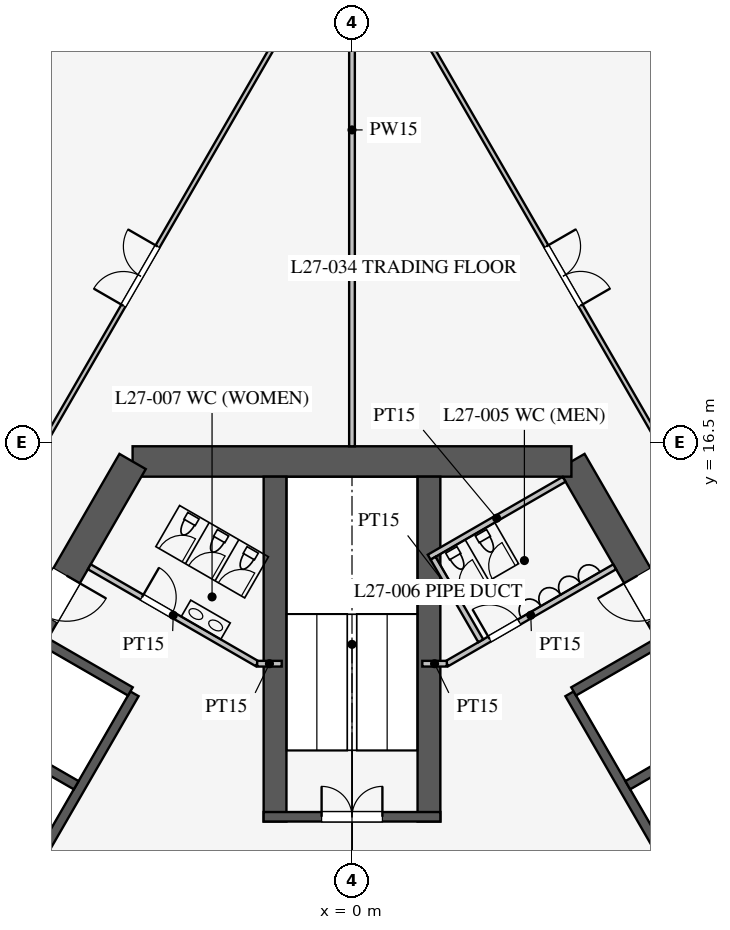
"""IFC4 building model, lengths in metres.
Left out: names, types, materials, properties, quantities, classifications, styles, units other than length and angle.
Written with IfcOpenShell. Run it as: python <this file> out.ifc"""

import sys

from ifc_helpers import new_model, si_unit, direction, frame, frame_2d, origin, place, context, subcontext, project, spatial, rectangle, extrude, element, fill, save


model = new_model("IFC4")
c1 = context("Model", 3, precision=1e-05, world=origin(), true_north=direction((0.0, 1.0)))
c2 = subcontext(c1, "Body", "Model", "MODEL_VIEW")
j1 = project(units=[si_unit("LENGTHUNIT", "METRE"), si_unit("PLANEANGLEUNIT", "RADIAN")], contexts=[c1])
p1 = place(None, origin())
s1 = spatial("IfcSite", under=j1, at=p1, CompositionType="ELEMENT")
p2 = place(p1, origin())
s2 = spatial("IfcBuilding", under=s1, at=p2, CompositionType="ELEMENT")
p3 = place(p2, frame((0.0, 0.0, 119.9)))
s3 = spatial("IfcBuildingStorey", under=s2, at=p3, CompositionType="ELEMENT", Elevation=119.9)
p4 = place(p3, frame((16.743, -3.0, 0.0), z_axis=(0.0, 0.0, 1.0), x_axis=(-0.500002442456, 0.866023993627, 0.0)))
e1 = element("IfcWall", 1, at=p4, inside=s3, PredefinedType="SHEAR", context=c2, shape_type="SweptSolid", body=[
    extrude(rectangle(XDim=21.939, YDim=0.8, at=frame_2d((10.97, 0.0))), origin(), (0.0, 0.0, 1.0), 4.2),
])
p5 = place(p4, frame((17.27, 0.0, 0.0)))
e2 = element("IfcOpeningElement", 2, at=p5, cuts=e1, PredefinedType="OPENING", context=c2, shape_type="SweptSolid", body=[
    extrude(rectangle(XDim=1.2, YDim=2.1, at=frame_2d((0.6, 1.05))), frame((0.0, 0.41, 0.0), z_axis=(0.0, -1.0, 0.0), x_axis=(1.0, 0.0, 0.0)), (0.0, 0.0, 1.0), 0.82),
])
p6 = place(p4, frame((3.47, 0.0, 0.0)))
e3 = element("IfcOpeningElement", 3, at=p6, cuts=e1, PredefinedType="OPENING", context=c2, shape_type="SweptSolid", body=[
    extrude(rectangle(XDim=1.2, YDim=2.1, at=frame_2d((0.6, 1.05))), frame((0.0, 0.41, 0.0), z_axis=(0.0, -1.0, 0.0), x_axis=(1.0, 0.0, 0.0)), (0.0, 0.0, 1.0), 0.82),
])
p7 = place(p3, frame((5.773, 16.0, 0.0), z_axis=(0.0, 0.0, 1.0), x_axis=(-1.0, 0.0, 0.0)))
e4 = element("IfcWall", 4, at=p7, inside=s3, PredefinedType="SHEAR", context=c2, shape_type="SweptSolid", body=[
    extrude(rectangle(XDim=11.547, YDim=0.8, at=frame_2d((5.773, 0.0))), origin(), (0.0, 0.0, 1.0), 4.2),
])
p8 = place(p3, frame((-5.773, 16.0, 0.0), z_axis=(0.0, 0.0, 1.0), x_axis=(-0.500002442456, -0.866023993627, 0.0)))
e5 = element("IfcWall", 5, at=p8, inside=s3, PredefinedType="SHEAR", context=c2, shape_type="SweptSolid", body=[
    extrude(rectangle(XDim=21.939, YDim=0.8, at=frame_2d((10.97, 0.0))), origin(), (0.0, 0.0, 1.0), 4.2),
])
p9 = place(p8, frame((17.27, 0.0, 0.0)))
e6 = element("IfcOpeningElement", 6, at=p9, cuts=e5, PredefinedType="OPENING", context=c2, shape_type="SweptSolid", body=[
    extrude(rectangle(XDim=1.2, YDim=2.1, at=frame_2d((0.6, 1.05))), frame((0.0, 0.41, 0.0), z_axis=(0.0, -1.0, 0.0), x_axis=(1.0, 0.0, 0.0)), (0.0, 0.0, 1.0), 0.82),
])
p10 = place(p8, frame((3.47, 0.0, 0.0)))
e7 = element("IfcOpeningElement", 7, at=p10, cuts=e5, PredefinedType="OPENING", context=c2, shape_type="SweptSolid", body=[
    extrude(rectangle(XDim=1.2, YDim=2.1, at=frame_2d((0.6, 1.05))), frame((0.0, 0.41, 0.0), z_axis=(0.0, -1.0, 0.0), x_axis=(1.0, 0.0, 0.0)), (0.0, 0.0, 1.0), 0.82),
])
p11 = place(p3, frame((11.424, 0.014, 0.0), z_axis=(0.0, 0.0, 1.0), x_axis=(-0.500001763848, 0.866024385424, 0.0)))
e8 = element("IfcWall", 8, at=p11, inside=s3, PredefinedType="SHEAR", context=c2, shape_type="SweptSolid", body=[
    extrude(rectangle(XDim=11.4, YDim=0.25, at=frame_2d((5.7, 0.0))), origin(), (0.0, 0.0, 1.0), 4.2),
])
p12 = place(p11, frame((0.975, 0.0, 0.0)))
e9 = element("IfcOpeningElement", 9, at=p12, cuts=e8, PredefinedType="OPENING", context=c2, shape_type="SweptSolid", body=[
    extrude(rectangle(XDim=0.9, YDim=2.1, at=frame_2d((0.45, 1.05))), frame((0.0, 0.135, 0.0), z_axis=(0.0, -1.0, 0.0), x_axis=(1.0, 0.0, 0.0)), (0.0, 0.0, 1.0), 0.27),
])
p13 = place(p11, frame((3.825, 0.0, 0.0)))
e10 = element("IfcOpeningElement", 10, at=p13, cuts=e8, PredefinedType="OPENING", context=c2, shape_type="SweptSolid", body=[
    extrude(rectangle(XDim=0.9, YDim=2.1, at=frame_2d((0.45, 1.05))), frame((0.0, 0.135, 0.0), z_axis=(0.0, -1.0, 0.0), x_axis=(1.0, 0.0, 0.0)), (0.0, 0.0, 1.0), 0.27),
])
p14 = place(p3, frame((7.257, 7.481, 0.0), z_axis=(0.0, 0.0, 1.0), x_axis=(0.866046643894, 0.499963209246, 0.0)))
e11 = element("IfcWall", 11, at=p14, inside=s3, PredefinedType="SHEAR", context=c2, shape_type="SweptSolid", body=[
    extrude(rectangle(XDim=2.575, YDim=0.25, at=frame_2d((1.288, 0.0))), origin(), (0.0, 0.0, 1.0), 4.2),
])
p15 = place(p3, frame((5.832, 9.949, 0.0), z_axis=(0.0, 0.0, 1.0), x_axis=(0.866029291668, 0.499993265928, 0.0)))
e12 = element("IfcWall", 12, at=p15, inside=s3, PredefinedType="SHEAR", context=c2, shape_type="SweptSolid", body=[
    extrude(rectangle(XDim=2.575, YDim=0.25, at=frame_2d((1.288, 0.0))), origin(), (0.0, 0.0, 1.0), 4.2),
])
p16 = place(p3, frame((-5.724, 9.886, 0.0), z_axis=(0.0, 0.0, 1.0), x_axis=(-0.500001763848, -0.866024385424, 0.0)))
e13 = element("IfcWall", 13, at=p16, inside=s3, PredefinedType="SHEAR", context=c2, shape_type="SweptSolid", body=[
    extrude(rectangle(XDim=11.4, YDim=0.25, at=frame_2d((5.7, 0.0))), origin(), (0.0, 0.0, 1.0), 4.2),
])
p17 = place(p16, frame((6.525, 0.0, 0.0)))
e14 = element("IfcOpeningElement", 14, at=p17, cuts=e13, PredefinedType="OPENING", context=c2, shape_type="SweptSolid", body=[
    extrude(rectangle(XDim=1.2, YDim=2.2, at=frame_2d((0.6, 1.1))), frame((0.0, 0.135, 0.0), z_axis=(0.0, -1.0, 0.0), x_axis=(1.0, 0.0, 0.0)), (0.0, 0.0, 1.0), 0.27),
])
p18 = place(p16, frame((9.375, 0.0, 0.0)))
e15 = element("IfcOpeningElement", 15, at=p18, cuts=e13, PredefinedType="OPENING", context=c2, shape_type="SweptSolid", body=[
    extrude(rectangle(XDim=1.2, YDim=2.2, at=frame_2d((0.6, 1.1))), frame((0.0, 0.135, 0.0), z_axis=(0.0, -1.0, 0.0), x_axis=(1.0, 0.0, 0.0)), (0.0, 0.0, 1.0), 0.27),
])
p19 = place(p3, frame((-5.832, 9.949, 0.0), z_axis=(0.0, 0.0, 1.0), x_axis=(-0.866029291668, 0.499993265928, 0.0)))
e16 = element("IfcWall", 16, at=p19, inside=s3, PredefinedType="SHEAR", context=c2, shape_type="SweptSolid", body=[
    extrude(rectangle(XDim=2.575, YDim=0.25, at=frame_2d((1.288, 0.0))), origin(), (0.0, 0.0, 1.0), 4.2),
])
p20 = place(p3, frame((-7.257, 7.481, 0.0), z_axis=(0.0, 0.0, 1.0), x_axis=(-0.866046643894, 0.499963209246, 0.0)))
e17 = element("IfcWall", 17, at=p20, inside=s3, PredefinedType="SHEAR", context=c2, shape_type="SweptSolid", body=[
    extrude(rectangle(XDim=2.575, YDim=0.25, at=frame_2d((1.288, 0.0))), origin(), (0.0, 0.0, 1.0), 4.2),
])
for number, where, z_axis, x_axis in (
    (18, (2.025, 6.525, 0.0), (0.0, 0.0, 1.0), (0.0, 1.0, 0.0)),
    (19, (-2.025, 6.525, 0.0), (0.0, 0.0, 1.0), (0.0, 1.0, 0.0)),
):
    element("IfcWall", number, at=place(p3, frame(where, z_axis=z_axis, x_axis=x_axis)), inside=s3, PredefinedType="SHEAR", context=c2, shape_type="SweptSolid", body=[
        extrude(rectangle(XDim=9.075, YDim=0.6, at=frame_2d((4.538, 0.0))), origin(), (0.0, 0.0, 1.0), 4.2),
    ])
p21 = place(p3, frame((2.325, 6.65, 0.0), z_axis=(0.0, 0.0, 1.0), x_axis=(-1.0, 0.0, 0.0)))
e20 = element("IfcWall", 20, at=p21, inside=s3, PredefinedType="SHEAR", context=c2, shape_type="SweptSolid", body=[
    extrude(rectangle(XDim=4.65, YDim=0.25, at=frame_2d((2.325, 0.0))), origin(), (0.0, 0.0, 1.0), 4.2),
])
p22 = place(p21, frame((1.525, 0.0, 0.0)))
e21 = element("IfcOpeningElement", 21, at=p22, cuts=e20, PredefinedType="OPENING", context=c2, shape_type="SweptSolid", body=[
    extrude(rectangle(XDim=1.6, YDim=2.1, at=frame_2d((0.8, 1.05))), frame((0.0, 0.135, 0.0), z_axis=(0.0, -1.0, 0.0), x_axis=(1.0, 0.0, 0.0)), (0.0, 0.0, 1.0), 0.27),
])
p23 = place(p3, frame((2.495, 10.678, 0.0), z_axis=(0.0, 0.0, 1.0), x_axis=(0.86602216432, 0.500005610874, 0.0)))
e22 = element("IfcWall", 22, at=p23, inside=s3, PredefinedType="PARTITIONING", context=c2, shape_type="SweptSolid", body=[
    extrude(rectangle(XDim=5.1, YDim=0.15, at=frame_2d((2.55, 0.0))), origin(), (0.0, 0.0, 1.0), 4.0),
])
p24 = place(p23, frame((1.3, 0.0, 0.0)))
e23 = element("IfcOpeningElement", 23, at=p24, cuts=e22, PredefinedType="OPENING", context=c2, shape_type="SweptSolid", body=[
    extrude(rectangle(XDim=0.9, YDim=2.1, at=frame_2d((0.45, 1.05))), frame((0.0, 0.085, 0.0), z_axis=(0.0, -1.0, 0.0), x_axis=(1.0, 0.0, 0.0)), (0.0, 0.0, 1.0), 0.17),
])
p25 = place(p3, frame((-2.495, 10.678, 0.0), z_axis=(0.0, 0.0, 1.0), x_axis=(-0.86602216432, 0.500005610874, 0.0)))
e24 = element("IfcWall", 24, at=p25, inside=s3, PredefinedType="PARTITIONING", context=c2, shape_type="SweptSolid", body=[
    extrude(rectangle(XDim=5.1, YDim=0.15, at=frame_2d((2.55, 0.0))), origin(), (0.0, 0.0, 1.0), 4.0),
])
p26 = place(p25, frame((2.6, 0.0, 0.0)))
e25 = element("IfcOpeningElement", 25, at=p26, cuts=e24, PredefinedType="OPENING", context=c2, shape_type="SweptSolid", body=[
    extrude(rectangle(XDim=0.9, YDim=2.1, at=frame_2d((0.45, 1.05))), frame((0.0, 0.085, 0.0), z_axis=(0.0, -1.0, 0.0), x_axis=(1.0, 0.0, 0.0)), (0.0, 0.0, 1.0), 0.17),
])
for number, where, z_axis, x_axis in (
    (26, (2.495, 10.678, 0.0), (0.0, 0.0, 1.0), (-1.0, 0.0, 0.0)),
    (27, (-2.495, 10.678, 0.0), (0.0, 0.0, 1.0), (1.0, 0.0, 0.0)),
):
    element("IfcWall", number, at=place(p3, frame(where, z_axis=z_axis, x_axis=x_axis)), inside=s3, PredefinedType="PARTITIONING", context=c2, shape_type="SweptSolid", body=[
        extrude(rectangle(XDim=0.645, YDim=0.15, at=frame_2d((0.323, 0.0))), origin(), (0.0, 0.0, 1.0), 4.0),
    ])
p27 = place(p3, frame((2.031, 13.482, 0.0), z_axis=(0.0, 0.0, 1.0), x_axis=(0.866050731258, 0.499956128963, 0.0)))
e28 = element("IfcWall", 28, at=p27, inside=s3, PredefinedType="PARTITIONING", context=c2, shape_type="SweptSolid", body=[
    extrude(rectangle(XDim=4.1, YDim=0.15, at=frame_2d((2.05, 0.0))), origin(), (0.0, 0.0, 1.0), 4.0),
])
p28 = place(p3, frame((3.389, 11.281, 0.0), z_axis=(0.0, 0.0, 1.0), x_axis=(-0.499989096993, 0.866031698547, 0.0)))
e29 = element("IfcWall", 29, at=p28, inside=s3, PredefinedType="PARTITIONING", context=c2, shape_type="SweptSolid", body=[
    extrude(rectangle(XDim=2.51, YDim=0.15, at=frame_2d((1.255, 0.0))), origin(), (0.0, 0.0, 1.0), 4.0),
])
p29 = place(p3, frame((0.0, 16.4, 0.0), z_axis=(0.0, 0.0, 1.0), x_axis=(0.0, 1.0, 0.0)))
e30 = element("IfcWall", 30, at=p29, inside=s3, PredefinedType="PARTITIONING", context=c2, shape_type="SweptSolid", body=[
    extrude(rectangle(XDim=16.65, YDim=0.15, at=frame_2d((8.325, 0.0))), origin(), (0.0, 0.0, 1.0), 2.3),
])
p30 = place(p3, frame((26.415, -15.231, 0.0), z_axis=(0.0, 0.0, 1.0), x_axis=(-0.50000091641, 0.866024874695, 0.0)))
e31 = element("IfcWall", 31, at=p30, inside=s3, PredefinedType="PARTITIONING", context=c2, shape_type="SweptSolid", body=[
    extrude(rectangle(XDim=52.796, YDim=0.12, at=frame_2d((26.398, 0.0))), origin(), (0.0, 0.0, 1.0), 2.9),
])
p31 = place(p30, frame((10.2, 0.0, 0.15)))
e32 = element("IfcOpeningElement", 32, at=p31, cuts=e31, PredefinedType="OPENING", context=c2, shape_type="SweptSolid", body=[
    extrude(rectangle(XDim=1.8, YDim=2.1, at=frame_2d((0.9, 1.05))), frame((0.0, 0.07, 0.0), z_axis=(0.0, -1.0, 0.0), x_axis=(1.0, 0.0, 0.0)), (0.0, 0.0, 1.0), 0.14),
])
p32 = place(p30, frame((40.8, 0.0, 0.15)))
e33 = element("IfcOpeningElement", 33, at=p32, cuts=e31, PredefinedType="OPENING", context=c2, shape_type="SweptSolid", body=[
    extrude(rectangle(XDim=1.8, YDim=2.1, at=frame_2d((0.9, 1.05))), frame((0.0, 0.07, 0.0), z_axis=(0.0, -1.0, 0.0), x_axis=(1.0, 0.0, 0.0)), (0.0, 0.0, 1.0), 0.14),
])
p33 = place(p3, frame((-0.016, 30.491, 0.0), z_axis=(0.0, 0.0, 1.0), x_axis=(-0.50000091641, -0.866024874695, 0.0)))
e34 = element("IfcWall", 34, at=p33, inside=s3, PredefinedType="PARTITIONING", context=c2, shape_type="SweptSolid", body=[
    extrude(rectangle(XDim=52.796, YDim=0.12, at=frame_2d((26.398, 0.0))), origin(), (0.0, 0.0, 1.0), 2.9),
])
p34 = place(p33, frame((10.2, 0.0, 0.15)))
e35 = element("IfcOpeningElement", 35, at=p34, cuts=e34, PredefinedType="OPENING", context=c2, shape_type="SweptSolid", body=[
    extrude(rectangle(XDim=1.8, YDim=2.1, at=frame_2d((0.9, 1.05))), frame((0.0, 0.07, 0.0), z_axis=(0.0, -1.0, 0.0), x_axis=(1.0, 0.0, 0.0)), (0.0, 0.0, 1.0), 0.14),
])
p35 = place(p33, frame((40.8, 0.0, 0.15)))
e36 = element("IfcOpeningElement", 36, at=p35, cuts=e34, PredefinedType="OPENING", context=c2, shape_type="SweptSolid", body=[
    extrude(rectangle(XDim=1.8, YDim=2.1, at=frame_2d((0.9, 1.05))), frame((0.0, 0.07, 0.0), z_axis=(0.0, -1.0, 0.0), x_axis=(1.0, 0.0, 0.0)), (0.0, 0.0, 1.0), 0.14),
])
p36 = place(p24, origin())
e37 = element("IfcDoor", 37, at=p36, inside=s3, OperationType="SINGLE_SWING_LEFT", PredefinedType="DOOR", context=c2, shape_type="SweptSolid", body=[
    extrude(rectangle(XDim=0.9, YDim=2.1, at=frame_2d((0.45, 1.05))), frame((0.0, 0.025, 0.0), z_axis=(0.0, -1.0, 0.0), x_axis=(1.0, 0.0, 0.0)), (0.0, 0.0, 1.0), 0.05),
])
fill(e23, e37)
p37 = place(p26, frame((0.9, 0.0, 0.0), z_axis=(0.0, 0.0, 1.0), x_axis=(-1.0, 0.0, 0.0)))
e38 = element("IfcDoor", 38, at=p37, inside=s3, OperationType="SINGLE_SWING_LEFT", PredefinedType="DOOR", context=c2, shape_type="SweptSolid", body=[
    extrude(rectangle(XDim=0.9, YDim=2.1, at=frame_2d((0.45, 1.05))), frame((0.0, 0.025, 0.0), z_axis=(0.0, -1.0, 0.0), x_axis=(1.0, 0.0, 0.0)), (0.0, 0.0, 1.0), 0.05),
])
fill(e25, e38)
p38 = place(p22, frame((1.6, 0.0, 0.0), z_axis=(0.0, 0.0, 1.0), x_axis=(-1.0, 0.0, 0.0)))
e39 = element("IfcDoor", 39, at=p38, inside=s3, OperationType="DOUBLE_DOOR_SINGLE_SWING", PredefinedType="DOOR", context=c2, shape_type="SweptSolid", body=[
    extrude(rectangle(XDim=1.6, YDim=2.1, at=frame_2d((0.8, 1.05))), frame((0.0, 0.025, 0.0), z_axis=(0.0, -1.0, 0.0), x_axis=(1.0, 0.0, 0.0)), (0.0, 0.0, 1.0), 0.05),
])
fill(e21, e39)
p39 = place(p5, origin())
e40 = element("IfcDoor", 40, at=p39, inside=s3, OperationType="SINGLE_SWING_RIGHT", PredefinedType="DOOR", context=c2, shape_type="SweptSolid", body=[
    extrude(rectangle(XDim=1.2, YDim=2.1, at=frame_2d((0.6, 1.05))), frame((0.0, 0.025, 0.0), z_axis=(0.0, -1.0, 0.0), x_axis=(1.0, 0.0, 0.0)), (0.0, 0.0, 1.0), 0.05),
])
fill(e2, e40)
p40 = place(p10, origin())
e41 = element("IfcDoor", 41, at=p40, inside=s3, OperationType="SINGLE_SWING_LEFT", PredefinedType="DOOR", context=c2, shape_type="SweptSolid", body=[
    extrude(rectangle(XDim=1.2, YDim=2.1, at=frame_2d((0.6, 1.05))), frame((0.0, 0.025, 0.0), z_axis=(0.0, -1.0, 0.0), x_axis=(1.0, 0.0, 0.0)), (0.0, 0.0, 1.0), 0.05),
])
fill(e7, e41)
p41 = place(p32, frame((1.8, 0.0, 0.0), z_axis=(0.0, 0.0, 1.0), x_axis=(-1.0, 0.0, 0.0)))
e42 = element("IfcDoor", 42, at=p41, inside=s3, OperationType="DOUBLE_DOOR_SINGLE_SWING", PredefinedType="DOOR", context=c2, shape_type="SweptSolid", body=[
    extrude(rectangle(XDim=1.8, YDim=2.1, at=frame_2d((0.9, 1.05))), frame((0.0, 0.025, 0.0), z_axis=(0.0, -1.0, 0.0), x_axis=(1.0, 0.0, 0.0)), (0.0, 0.0, 1.0), 0.05),
])
fill(e33, e42)
p42 = place(p34, frame((1.8, 0.0, 0.0), z_axis=(0.0, 0.0, 1.0), x_axis=(-1.0, 0.0, 0.0)))
e43 = element("IfcDoor", 43, at=p42, inside=s3, OperationType="DOUBLE_DOOR_SINGLE_SWING", PredefinedType="DOOR", context=c2, shape_type="SweptSolid", body=[
    extrude(rectangle(XDim=1.8, YDim=2.1, at=frame_2d((0.9, 1.05))), frame((0.0, 0.025, 0.0), z_axis=(0.0, -1.0, 0.0), x_axis=(1.0, 0.0, 0.0)), (0.0, 0.0, 1.0), 0.05),
])
fill(e35, e43)
save(model, sys.argv[1])
